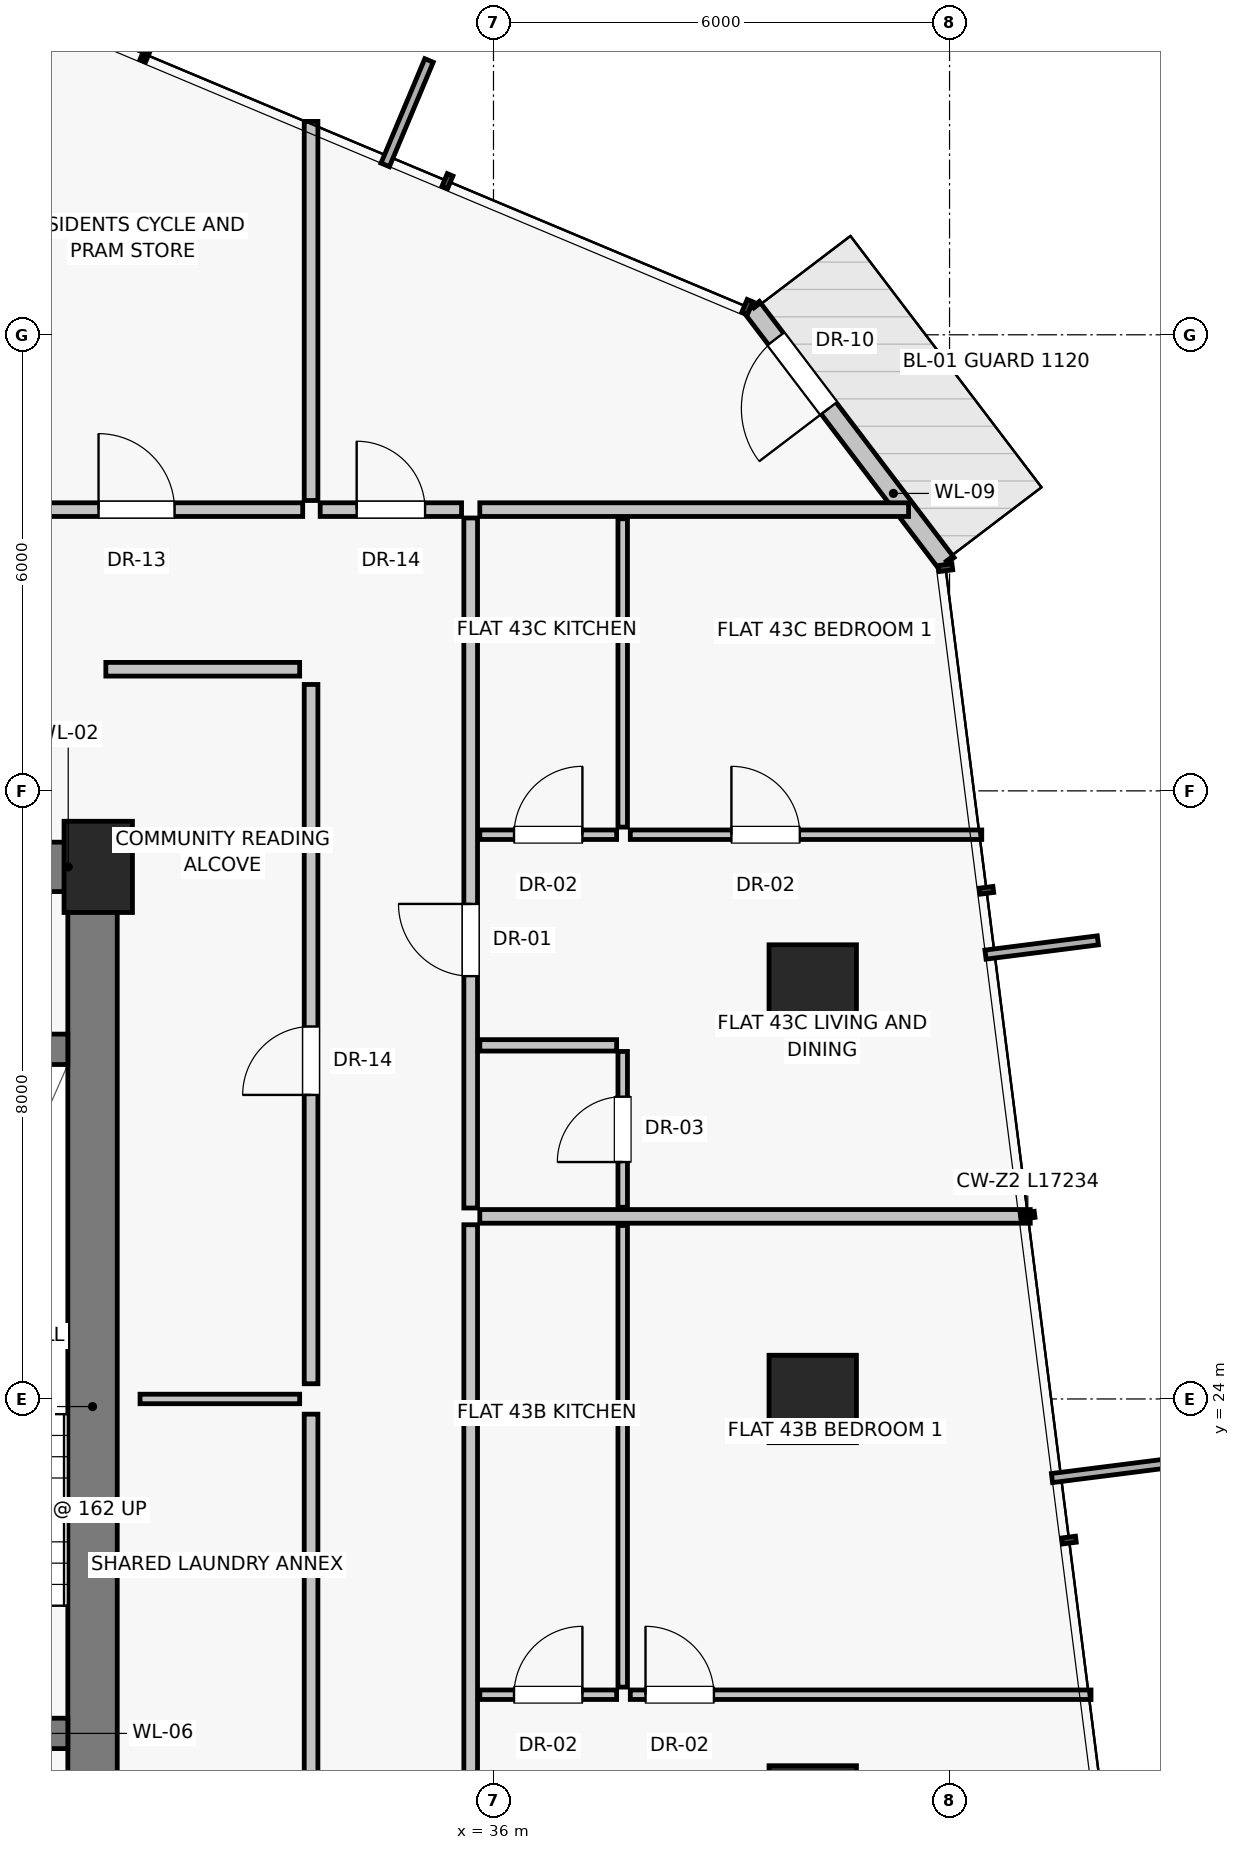
"""IFC4 building model, lengths in metres.
Left out: names, types, materials, properties, quantities, classifications, styles, units other than length and angle.
Written with IfcOpenShell. Run it as: python <this file> out.ifc"""

import sys

from ifc_helpers import new_model, si_unit, direction, frame, frame_2d, origin, origin_2d, place, context, subcontext, project, spatial, rectangle, extrude, source, transform, mapped, element, fill, save


model = new_model("IFC4")
c1 = context("Model", 3, precision=1e-05, world=origin(), true_north=direction((0.0, 1.0)))
c2 = subcontext(c1, "Body", "Model", "MODEL_VIEW")
j1 = project(units=[si_unit("LENGTHUNIT", "METRE"), si_unit("PLANEANGLEUNIT", "RADIAN")], contexts=[c1])
p1 = place(None, origin())
s1 = spatial("IfcSite", under=j1, at=p1, CompositionType="ELEMENT")
p2 = place(p1, origin())
s2 = spatial("IfcBuilding", under=s1, at=p2, CompositionType="ELEMENT")
p3 = place(p2, frame((0.0, 0.0, 152.25)))
s3 = spatial("IfcBuildingStorey", under=s2, at=p3, CompositionType="ELEMENT", Elevation=152.25)
p4 = place(p3, frame((30.8, 31.0, 0.0), z_axis=(0.0, 0.0, 1.0), x_axis=(1.0, 0.0, 0.0)))
e1 = element("IfcColumn", 1, at=p4, inside=s3, PredefinedType="PILASTER", context=c2, shape_type="SweptSolid", body=[
    extrude(rectangle(XDim=0.9, YDim=1.2, at=origin_2d()), origin(), (0.0, 0.0, 1.0), 3.25),
])
for number, where, z_axis, x_axis in (
    (2, (40.2, 18.6, 0.0), (0.0, 0.0, 1.0), (1.0, 0.0, 0.0)),
    (3, (40.2, 24.0, 0.0), (0.0, 0.0, 1.0), (1.0, 0.0, 0.0)),
    (4, (40.2, 29.4, 0.0), (0.0, 0.0, 1.0), (1.0, 0.0, 0.0)),
):
    element("IfcColumn", number, at=place(p3, frame(where, z_axis=z_axis, x_axis=x_axis)), inside=s3, PredefinedType="COLUMN", context=c2, shape_type="SweptSolid", body=[
        extrude(rectangle(XDim=1.15, YDim=1.15, at=origin_2d()), origin(), (0.0, 0.0, 1.0), 3.25),
    ])
p5 = place(p3, frame((41.96, 34.994, 0.0), z_axis=(0.0, 0.0, 1.0), x_axis=(-0.605182702293, 0.796086613909, 0.0)))
e5 = element("IfcWall", 5, at=p5, inside=s3, PredefinedType="SOLIDWALL", context=c2, shape_type="SweptSolid", body=[
    extrude(rectangle(XDim=4.233, YDim=0.25, at=frame_2d((2.117, 0.0))), origin(), (0.0, 0.0, 1.0), 3.0),
])
p6 = place(p5, frame((2.56, 0.0, 0.0)))
e6 = element("IfcOpeningElement", 6, at=p6, cuts=e5, PredefinedType="OPENING", context=c2, shape_type="SweptSolid", body=[
    extrude(rectangle(XDim=1.15, YDim=2.25, at=frame_2d((0.575, 1.125))), frame((0.0, 0.135, 0.0), z_axis=(0.0, -1.0, 0.0), x_axis=(1.0, 0.0, 0.0)), (0.0, 0.0, 1.0), 0.27),
])
p7 = place(p3, frame((30.725, 16.8, 0.0), z_axis=(0.0, 0.0, 1.0), x_axis=(0.0, 1.0, 0.0)))
e7 = element("IfcWall", 7, at=p7, inside=s3, PredefinedType="SHEAR", context=c2, shape_type="SweptSolid", body=[
    extrude(rectangle(XDim=14.2, YDim=0.65, at=frame_2d((7.1, 0.0))), origin(), (0.0, 0.0, 1.0), 3.0),
])
p8 = place(p3, frame((27.0, 31.0, 0.0), z_axis=(0.0, 0.0, 1.0), x_axis=(1.0, 0.0, 0.0)))
e8 = element("IfcWall", 8, at=p8, inside=s3, PredefinedType="SHEAR", context=c2, shape_type="SweptSolid", body=[
    extrude(rectangle(XDim=3.8, YDim=0.65, at=frame_2d((1.9, 0.0))), origin(), (0.0, 0.0, 1.0), 3.0),
])
p9 = place(p8, frame((0.45, 0.0, 0.0)))
e9 = element("IfcOpeningElement", 9, at=p9, cuts=e8, PredefinedType="OPENING", context=c2, shape_type="SweptSolid", body=[
    extrude(rectangle(XDim=0.86, YDim=2.01, at=frame_2d((0.43, 1.005))), frame((0.0, 0.335, 0.0), z_axis=(0.0, -1.0, 0.0), x_axis=(1.0, 0.0, 0.0)), (0.0, 0.0, 1.0), 0.67),
])
p10 = place(p8, frame((1.9, 0.0, 0.0)))
e10 = element("IfcOpeningElement", 10, at=p10, cuts=e8, PredefinedType="OPENING", context=c2, shape_type="SweptSolid", body=[
    extrude(rectangle(XDim=0.86, YDim=2.01, at=frame_2d((0.43, 1.005))), frame((0.0, 0.335, 0.0), z_axis=(0.0, -1.0, 0.0), x_axis=(1.0, 0.0, 0.0)), (0.0, 0.0, 1.0), 0.67),
])
p11 = place(p3, frame((27.0, 19.6, 0.0), z_axis=(0.0, 0.0, 1.0), x_axis=(1.0, 0.0, 0.0)))
e11 = element("IfcWall", 11, at=p11, inside=s3, PredefinedType="SHEAR", context=c2, shape_type="SweptSolid", body=[
    extrude(rectangle(XDim=3.4, YDim=0.4, at=frame_2d((1.7, 0.0))), origin(), (0.0, 0.0, 1.0), 3.0),
])
p12 = place(p11, frame((1.05, 0.0, 0.0)))
e12 = element("IfcOpeningElement", 12, at=p12, cuts=e11, PredefinedType="OPENING", context=c2, shape_type="SweptSolid", body=[
    extrude(rectangle(XDim=1.1, YDim=2.03, at=frame_2d((0.55, 1.015))), frame((0.0, 0.21, 0.0), z_axis=(0.0, -1.0, 0.0), x_axis=(1.0, 0.0, 0.0)), (0.0, 0.0, 1.0), 0.42),
])
p13 = place(p3, frame((27.0, 28.6, 0.0), z_axis=(0.0, 0.0, 1.0), x_axis=(1.0, 0.0, 0.0)))
e13 = element("IfcWall", 13, at=p13, inside=s3, PredefinedType="SHEAR", context=c2, shape_type="SweptSolid", body=[
    extrude(rectangle(XDim=3.4, YDim=0.4, at=frame_2d((1.7, 0.0))), origin(), (0.0, 0.0, 1.0), 3.0),
])
p14 = place(p3, frame((33.6, 14.4, 0.0), z_axis=(0.0, 0.0, 1.0), x_axis=(0.0, 1.0, 0.0)))
e14 = element("IfcWall", 14, at=p14, inside=s3, PredefinedType="PARTITIONING", context=c2, shape_type="SweptSolid", body=[
    extrude(rectangle(XDim=9.4, YDim=0.18, at=frame_2d((4.7, 0.0))), origin(), (0.0, 0.0, 1.0), 3.0),
])
p15 = place(p14, frame((3.8, 0.0, 0.0)))
e15 = element("IfcOpeningElement", 15, at=p15, cuts=e14, PredefinedType="OPENING", context=c2, shape_type="SweptSolid", body=[
    extrude(rectangle(XDim=0.9, YDim=2.01, at=frame_2d((0.45, 1.005))), frame((0.0, 0.1, 0.0), z_axis=(0.0, -1.0, 0.0), x_axis=(1.0, 0.0, 0.0)), (0.0, 0.0, 1.0), 0.2),
])
p16 = place(p3, frame((33.6, 24.2, 0.0), z_axis=(0.0, 0.0, 1.0), x_axis=(0.0, 1.0, 0.0)))
e16 = element("IfcWall", 16, at=p16, inside=s3, PredefinedType="PARTITIONING", context=c2, shape_type="SweptSolid", body=[
    extrude(rectangle(XDim=9.2, YDim=0.18, at=frame_2d((4.6, 0.0))), origin(), (0.0, 0.0, 1.0), 3.0),
])
p17 = place(p16, frame((3.8, 0.0, 0.0)))
e17 = element("IfcOpeningElement", 17, at=p17, cuts=e16, PredefinedType="OPENING", context=c2, shape_type="SweptSolid", body=[
    extrude(rectangle(XDim=0.9, YDim=2.01, at=frame_2d((0.45, 1.005))), frame((0.0, 0.1, 0.0), z_axis=(0.0, -1.0, 0.0), x_axis=(1.0, 0.0, 0.0)), (0.0, 0.0, 1.0), 0.2),
])
p18 = place(p3, frame((31.35, 24.0, 0.0), z_axis=(0.0, 0.0, 1.0), x_axis=(1.0, 0.0, 0.0)))
e18 = element("IfcWall", 18, at=p18, inside=s3, PredefinedType="PARTITIONING", context=c2, shape_type="SweptSolid", body=[
    extrude(rectangle(XDim=2.1, YDim=0.125, at=frame_2d((1.05, 0.0))), origin(), (0.0, 0.0, 1.0), 3.0),
])
p19 = place(p3, frame((30.9, 33.6, 0.0), z_axis=(0.0, 0.0, 1.0), x_axis=(1.0, 0.0, 0.0)))
e19 = element("IfcWall", 19, at=p19, inside=s3, PredefinedType="PARTITIONING", context=c2, shape_type="SweptSolid", body=[
    extrude(rectangle(XDim=2.55, YDim=0.18, at=frame_2d((1.275, 0.0))), origin(), (0.0, 0.0, 1.0), 3.0),
])
p20 = place(p3, frame((33.6, 35.82, 0.0), z_axis=(0.0, 0.0, 1.0), x_axis=(0.0, 1.0, 0.0)))
e20 = element("IfcWall", 20, at=p20, inside=s3, PredefinedType="PARTITIONING", context=c2, shape_type="SweptSolid", body=[
    extrude(rectangle(XDim=4.987, YDim=0.18, at=frame_2d((2.494, 0.0))), origin(), (0.0, 0.0, 1.0), 3.0),
])
p21 = place(p3, frame((29.118, 35.7, 0.0), z_axis=(0.0, 0.0, 1.0), x_axis=(1.0, 0.0, 0.0)))
e21 = element("IfcWall", 21, at=p21, inside=s3, PredefinedType="PARTITIONING", context=c2, shape_type="SweptSolid", body=[
    extrude(rectangle(XDim=4.372, YDim=0.18, at=frame_2d((2.186, 0.0))), origin(), (0.0, 0.0, 1.0), 2.58),
])
p22 = place(p21, frame((1.686, 0.0, 0.0)))
e22 = element("IfcOpeningElement", 22, at=p22, cuts=e21, PredefinedType="OPENING", context=c2, shape_type="SweptSolid", body=[
    extrude(rectangle(XDim=1.0, YDim=2.01, at=frame_2d((0.5, 1.005))), frame((0.0, 0.1, 0.0), z_axis=(0.0, -1.0, 0.0), x_axis=(1.0, 0.0, 0.0)), (0.0, 0.0, 1.0), 0.2),
])
p23 = place(p3, frame((35.82, 35.7, 0.0), z_axis=(0.0, 0.0, 1.0), x_axis=(1.0, 0.0, 0.0)))
e23 = element("IfcWall", 23, at=p23, inside=s3, PredefinedType="PARTITIONING", context=c2, shape_type="SweptSolid", body=[
    extrude(rectangle(XDim=5.641, YDim=0.18, at=frame_2d((2.82, 0.0))), origin(), (0.0, 0.0, 1.0), 3.0),
])
p24 = place(p3, frame((35.7, 12.21, 0.0), z_axis=(0.0, 0.0, 1.0), x_axis=(0.0, 1.0, 0.0)))
e24 = element("IfcWall", 24, at=p24, inside=s3, PredefinedType="PARTITIONING", context=c2, shape_type="SweptSolid", body=[
    extrude(rectangle(XDim=14.082, YDim=0.18, at=frame_2d((7.041, 0.0))), origin(), (0.0, 0.0, 1.0), 2.58),
])
p25 = place(p24, frame((4.544, 0.0, 0.0)))
e25 = element("IfcOpeningElement", 25, at=p25, cuts=e24, PredefinedType="OPENING", context=c2, shape_type="SweptSolid", body=[
    extrude(rectangle(XDim=0.95, YDim=2.02, at=frame_2d((0.475, 1.01))), frame((0.0, 0.1, 0.0), z_axis=(0.0, -1.0, 0.0), x_axis=(1.0, 0.0, 0.0)), (0.0, 0.0, 1.0), 0.2),
])
p26 = place(p3, frame((35.82, 20.109, 0.0), z_axis=(0.0, 0.0, 1.0), x_axis=(1.0, 0.0, 0.0)))
e26 = element("IfcWall", 26, at=p26, inside=s3, PredefinedType="PARTITIONING", context=c2, shape_type="SweptSolid", body=[
    extrude(rectangle(XDim=1.8, YDim=0.125, at=frame_2d((0.9, 0.0))), origin(), (0.0, 0.0, 1.0), 3.0),
])
p27 = place(p26, frame((0.45, 0.0, 0.0)))
e27 = element("IfcOpeningElement", 27, at=p27, cuts=e26, PredefinedType="OPENING", context=c2, shape_type="SweptSolid", body=[
    extrude(rectangle(XDim=0.9, YDim=2.01, at=frame_2d((0.45, 1.005))), frame((0.0, 0.073, 0.0), z_axis=(0.0, -1.0, 0.0), x_axis=(1.0, 0.0, 0.0)), (0.0, 0.0, 1.0), 0.145),
])
p28 = place(p3, frame((37.7, 20.209, 0.0), z_axis=(0.0, 0.0, 1.0), x_axis=(0.0, 1.0, 0.0)))
e28 = element("IfcWall", 28, at=p28, inside=s3, PredefinedType="PARTITIONING", context=c2, shape_type="SweptSolid", body=[
    extrude(rectangle(XDim=6.073, YDim=0.125, at=frame_2d((3.037, 0.0))), origin(), (0.0, 0.0, 1.0), 3.0),
])
p29 = place(p3, frame((37.8, 20.109, 0.0), z_axis=(0.0, 0.0, 1.0), x_axis=(1.0, 0.0, 0.0)))
e29 = element("IfcWall", 29, at=p29, inside=s3, PredefinedType="PARTITIONING", context=c2, shape_type="SweptSolid", body=[
    extrude(rectangle(XDim=6.061, YDim=0.125, at=frame_2d((3.031, 0.0))), origin(), (0.0, 0.0, 1.0), 3.0),
])
p30 = place(p29, frame((0.2, 0.0, 0.0)))
e30 = element("IfcOpeningElement", 30, at=p30, cuts=e29, PredefinedType="OPENING", context=c2, shape_type="SweptSolid", body=[
    extrude(rectangle(XDim=0.9, YDim=2.01, at=frame_2d((0.45, 1.005))), frame((0.0, 0.073, 0.0), z_axis=(0.0, -1.0, 0.0), x_axis=(1.0, 0.0, 0.0)), (0.0, 0.0, 1.0), 0.145),
])
p31 = place(p3, frame((35.82, 26.402, 0.0), z_axis=(0.0, 0.0, 1.0), x_axis=(1.0, 0.0, 0.0)))
e31 = element("IfcWall", 31, at=p31, inside=s3, PredefinedType="PARTITIONING", context=c2, shape_type="SweptSolid", body=[
    extrude(rectangle(XDim=7.242, YDim=0.18, at=frame_2d((3.621, 0.0))), origin(), (0.0, 0.0, 1.0), 3.0),
])
p32 = place(p3, frame((35.7, 26.512, 0.0), z_axis=(0.0, 0.0, 1.0), x_axis=(0.0, 1.0, 0.0)))
e32 = element("IfcWall", 32, at=p32, inside=s3, PredefinedType="PARTITIONING", context=c2, shape_type="SweptSolid", body=[
    extrude(rectangle(XDim=9.078, YDim=0.18, at=frame_2d((4.539, 0.0))), origin(), (0.0, 0.0, 1.0), 2.58),
])
p33 = place(p32, frame((3.051, 0.0, 0.0)))
e33 = element("IfcOpeningElement", 33, at=p33, cuts=e32, PredefinedType="OPENING", context=c2, shape_type="SweptSolid", body=[
    extrude(rectangle(XDim=0.95, YDim=2.02, at=frame_2d((0.475, 1.01))), frame((0.0, 0.1, 0.0), z_axis=(0.0, -1.0, 0.0), x_axis=(1.0, 0.0, 0.0)), (0.0, 0.0, 1.0), 0.2),
])
p34 = place(p3, frame((35.82, 28.652, 0.0), z_axis=(0.0, 0.0, 1.0), x_axis=(1.0, 0.0, 0.0)))
e34 = element("IfcWall", 34, at=p34, inside=s3, PredefinedType="PARTITIONING", context=c2, shape_type="SweptSolid", body=[
    extrude(rectangle(XDim=1.8, YDim=0.15, at=frame_2d((0.9, 0.0))), origin(), (0.0, 0.0, 1.0), 3.0),
])
p35 = place(p3, frame((37.7, 26.522, 0.0), z_axis=(0.0, 0.0, 1.0), x_axis=(0.0, 1.0, 0.0)))
e35 = element("IfcWall", 35, at=p35, inside=s3, PredefinedType="PARTITIONING", context=c2, shape_type="SweptSolid", body=[
    extrude(rectangle(XDim=2.05, YDim=0.125, at=frame_2d((1.025, 0.0))), origin(), (0.0, 0.0, 1.0), 3.0),
])
p36 = place(p35, frame((0.595, 0.0, 0.0)))
e36 = element("IfcOpeningElement", 36, at=p36, cuts=e35, PredefinedType="OPENING", context=c2, shape_type="SweptSolid", body=[
    extrude(rectangle(XDim=0.86, YDim=2.01, at=frame_2d((0.43, 1.005))), frame((0.0, 0.073, 0.0), z_axis=(0.0, -1.0, 0.0), x_axis=(1.0, 0.0, 0.0)), (0.0, 0.0, 1.0), 0.145),
])
p37 = place(p3, frame((35.82, 31.423, 0.0), z_axis=(0.0, 0.0, 1.0), x_axis=(1.0, 0.0, 0.0)))
e37 = element("IfcWall", 37, at=p37, inside=s3, PredefinedType="PARTITIONING", context=c2, shape_type="SweptSolid", body=[
    extrude(rectangle(XDim=1.8, YDim=0.125, at=frame_2d((0.9, 0.0))), origin(), (0.0, 0.0, 1.0), 3.0),
])
p38 = place(p37, frame((0.45, 0.0, 0.0)))
e38 = element("IfcOpeningElement", 38, at=p38, cuts=e37, PredefinedType="OPENING", context=c2, shape_type="SweptSolid", body=[
    extrude(rectangle(XDim=0.9, YDim=2.01, at=frame_2d((0.45, 1.005))), frame((0.0, 0.073, 0.0), z_axis=(0.0, -1.0, 0.0), x_axis=(1.0, 0.0, 0.0)), (0.0, 0.0, 1.0), 0.145),
])
p39 = place(p3, frame((37.7, 31.523, 0.0), z_axis=(0.0, 0.0, 1.0), x_axis=(0.0, 1.0, 0.0)))
e39 = element("IfcWall", 39, at=p39, inside=s3, PredefinedType="PARTITIONING", context=c2, shape_type="SweptSolid", body=[
    extrude(rectangle(XDim=4.057, YDim=0.125, at=frame_2d((2.029, 0.0))), origin(), (0.0, 0.0, 1.0), 3.0),
])
p40 = place(p3, frame((37.8, 31.423, 0.0), z_axis=(0.0, 0.0, 1.0), x_axis=(1.0, 0.0, 0.0)))
e40 = element("IfcWall", 40, at=p40, inside=s3, PredefinedType="PARTITIONING", context=c2, shape_type="SweptSolid", body=[
    extrude(rectangle(XDim=4.624, YDim=0.125, at=frame_2d((2.312, 0.0))), origin(), (0.0, 0.0, 1.0), 3.0),
])
p41 = place(p40, frame((1.33, 0.0, 0.0)))
e41 = element("IfcOpeningElement", 41, at=p41, cuts=e40, PredefinedType="OPENING", context=c2, shape_type="SweptSolid", body=[
    extrude(rectangle(XDim=0.9, YDim=2.01, at=frame_2d((0.45, 1.005))), frame((0.0, 0.073, 0.0), z_axis=(0.0, -1.0, 0.0), x_axis=(1.0, 0.0, 0.0)), (0.0, 0.0, 1.0), 0.145),
])
p42 = place(p3, frame((33.72, 35.7, 0.0), z_axis=(0.0, 0.0, 1.0), x_axis=(1.0, 0.0, 0.0)))
e42 = element("IfcWall", 42, at=p42, inside=s3, PredefinedType="PARTITIONING", context=c2, shape_type="SweptSolid", body=[
    extrude(rectangle(XDim=1.86, YDim=0.18, at=frame_2d((0.93, 0.0))), origin(), (0.0, 0.0, 1.0), 3.0),
])
p43 = place(p42, frame((0.48, 0.0, 0.0)))
e43 = element("IfcOpeningElement", 43, at=p43, cuts=e42, PredefinedType="OPENING", context=c2, shape_type="SweptSolid", body=[
    extrude(rectangle(XDim=0.9, YDim=2.01, at=frame_2d((0.45, 1.005))), frame((0.0, 0.1, 0.0), z_axis=(0.0, -1.0, 0.0), x_axis=(1.0, 0.0, 0.0)), (0.0, 0.0, 1.0), 0.2),
])
m1 = source(origin(), c2, "Body", "SweptSolid", [
    extrude(rectangle(XDim=1.15, YDim=2.25, at=frame_2d((0.575, 1.125))), frame((0.0, 0.025, 0.0), z_axis=(0.0, -1.0, 0.0), x_axis=(1.0, 0.0, 0.0)), (0.0, 0.0, 1.0), 0.05),
])
p44 = place(p6, frame((1.15, 0.0, 0.0), z_axis=(0.0, 0.0, 1.0), x_axis=(-1.0, 0.0, 0.0)))
e44 = element("IfcDoor", 44, at=p44, inside=s3, OperationType="SINGLE_SWING_LEFT", PredefinedType="DOOR", context=c2, shape_type="MappedRepresentation", body=[
    mapped(m1, transform((0.0, 0.0, 0.0), scale=1.0)),
])
fill(e6, e44)
m2 = source(origin(), c2, "Body", "SweptSolid", [
    extrude(rectangle(XDim=0.9, YDim=2.01, at=frame_2d((0.45, 1.005))), frame((0.0, 0.025, 0.0), z_axis=(0.0, -1.0, 0.0), x_axis=(1.0, 0.0, 0.0)), (0.0, 0.0, 1.0), 0.05),
])
p45 = place(p17, origin())
e45 = element("IfcDoor", 45, at=p45, inside=s3, OperationType="SINGLE_SWING_LEFT", PredefinedType="DOOR", context=c2, shape_type="MappedRepresentation", body=[
    mapped(m2, transform((0.0, 0.0, 0.0), scale=1.0)),
])
fill(e17, e45)
m3 = source(origin(), c2, "Body", "SweptSolid", [
    extrude(rectangle(XDim=1.0, YDim=2.01, at=frame_2d((0.5, 1.005))), frame((0.0, 0.025, 0.0), z_axis=(0.0, -1.0, 0.0), x_axis=(1.0, 0.0, 0.0)), (0.0, 0.0, 1.0), 0.05),
])
p46 = place(p22, origin())
e46 = element("IfcDoor", 46, at=p46, inside=s3, OperationType="SINGLE_SWING_LEFT", PredefinedType="DOOR", context=c2, shape_type="MappedRepresentation", body=[
    mapped(m3, transform((0.0, 0.0, 0.0), scale=1.0)),
])
fill(e22, e46)
p47 = place(p27, origin())
e47 = element("IfcDoor", 47, at=p47, inside=s3, OperationType="SINGLE_SWING_RIGHT", PredefinedType="DOOR", context=c2, shape_type="MappedRepresentation", body=[
    mapped(m2, transform((0.0, 0.0, 0.0), scale=1.0)),
])
fill(e27, e47)
p48 = place(p30, origin())
e48 = element("IfcDoor", 48, at=p48, inside=s3, OperationType="SINGLE_SWING_LEFT", PredefinedType="DOOR", context=c2, shape_type="MappedRepresentation", body=[
    mapped(m2, transform((0.0, 0.0, 0.0), scale=1.0)),
])
fill(e30, e48)
m4 = source(origin(), c2, "Body", "SweptSolid", [
    extrude(rectangle(XDim=0.95, YDim=2.02, at=frame_2d((0.475, 1.01))), frame((0.0, 0.025, 0.0), z_axis=(0.0, -1.0, 0.0), x_axis=(1.0, 0.0, 0.0)), (0.0, 0.0, 1.0), 0.05),
])
p49 = place(p33, origin())
e49 = element("IfcDoor", 49, at=p49, inside=s3, OperationType="SINGLE_SWING_RIGHT", PredefinedType="DOOR", context=c2, shape_type="MappedRepresentation", body=[
    mapped(m4, transform((0.0, 0.0, 0.0), scale=1.0)),
])
fill(e33, e49)
m5 = source(origin(), c2, "Body", "SweptSolid", [
    extrude(rectangle(XDim=0.86, YDim=2.01, at=frame_2d((0.43, 1.005))), frame((0.0, 0.025, 0.0), z_axis=(0.0, -1.0, 0.0), x_axis=(1.0, 0.0, 0.0)), (0.0, 0.0, 1.0), 0.05),
])
p50 = place(p36, origin())
e50 = element("IfcDoor", 50, at=p50, inside=s3, OperationType="SINGLE_SWING_LEFT", PredefinedType="DOOR", context=c2, shape_type="MappedRepresentation", body=[
    mapped(m5, transform((0.0, 0.0, 0.0), scale=1.0)),
])
fill(e36, e50)
p51 = place(p38, origin())
e51 = element("IfcDoor", 51, at=p51, inside=s3, OperationType="SINGLE_SWING_RIGHT", PredefinedType="DOOR", context=c2, shape_type="MappedRepresentation", body=[
    mapped(m2, transform((0.0, 0.0, 0.0), scale=1.0)),
])
fill(e38, e51)
p52 = place(p41, origin())
e52 = element("IfcDoor", 52, at=p52, inside=s3, OperationType="SINGLE_SWING_LEFT", PredefinedType="DOOR", context=c2, shape_type="MappedRepresentation", body=[
    mapped(m2, transform((0.0, 0.0, 0.0), scale=1.0)),
])
fill(e41, e52)
p53 = place(p43, origin())
e53 = element("IfcDoor", 53, at=p53, inside=s3, OperationType="SINGLE_SWING_LEFT", PredefinedType="DOOR", context=c2, shape_type="MappedRepresentation", body=[
    mapped(m2, transform((0.0, 0.0, 0.0), scale=1.0)),
])
fill(e43, e53)
save(model, sys.argv[1])
